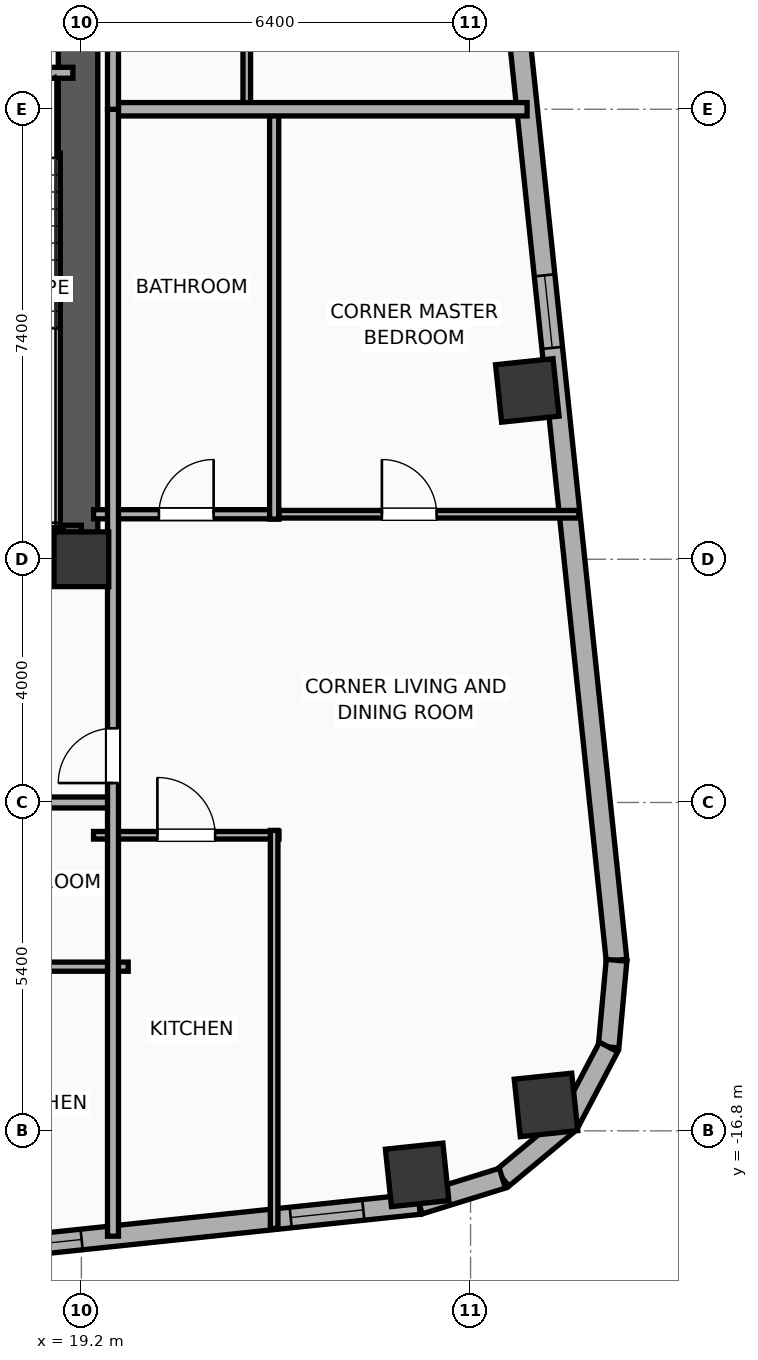
"""IFC4 building model, lengths in metres.
Left out: names, types, materials, properties, quantities, classifications, styles, units other than length and angle.
Written with IfcOpenShell. Run it as: python <this file> out.ifc"""

import sys

from ifc_helpers import new_model, si_unit, direction, frame, frame_2d, origin, origin_2d, place, context, subcontext, project, spatial, rectangle, hollow_rectangle, hollow_circle, extrude, element, fill, save


model = new_model("IFC4")
c1 = context("Model", 3, precision=1e-05, world=origin(), true_north=direction((0.0, 1.0)))
c2 = subcontext(c1, "Body", "Model", "MODEL_VIEW")
j1 = project(units=[si_unit("LENGTHUNIT", "METRE"), si_unit("PLANEANGLEUNIT", "RADIAN")], contexts=[c1])
p1 = place(None, origin())
s1 = spatial("IfcSite", under=j1, at=p1, CompositionType="ELEMENT")
p2 = place(p1, origin())
s2 = spatial("IfcBuilding", under=s1, at=p2, CompositionType="ELEMENT")
p3 = place(p2, frame((0.0, 0.0, 152.1)))
s3 = spatial("IfcBuildingStorey", under=s2, at=p3, CompositionType="ELEMENT", Elevation=152.1)
p4 = place(p3, frame((19.2, -7.4, 0.0), z_axis=(0.0, 0.0, 1.0), x_axis=(1.0, 0.0, 0.0)))
e1 = element("IfcColumn", 1, at=p4, inside=s3, PredefinedType="COLUMN", context=c2, shape_type="SweptSolid", body=[
    extrude(rectangle(XDim=0.9, YDim=0.9, at=origin_2d()), origin(), (0.0, 0.0, 1.0), 3.9),
])
p5 = place(p3, frame((12.175, -7.4, 0.0), z_axis=(0.0, 0.0, 1.0), x_axis=(1.0, 0.0, 0.0)))
e2 = element("IfcWall", 2, at=p5, inside=s3, PredefinedType="SHEAR", context=c2, shape_type="SweptSolid", body=[
    extrude(rectangle(XDim=7.25, YDim=0.45, at=frame_2d((3.625, 0.0))), origin(), (0.0, 0.0, 1.0), 3.65),
])
p6 = place(p3, frame((19.145, -7.4, 0.0), z_axis=(0.0, 0.0, 1.0), x_axis=(0.0, 1.0, 0.0)))
e3 = element("IfcWall", 3, at=p6, inside=s3, PredefinedType="SHEAR", context=c2, shape_type="SweptSolid", body=[
    extrude(rectangle(XDim=14.8, YDim=0.65, at=frame_2d((7.4, 0.0))), origin(), (0.0, 0.0, 1.0), 3.65),
])
p7 = place(p3, frame((15.74, -6.965, 0.0), z_axis=(0.0, 0.0, 1.0), x_axis=(1.0, 0.0, 0.0)))
e4 = element("IfcWall", 4, at=p7, inside=s3, PredefinedType="SOLIDWALL", context=c2, shape_type="SweptSolid", body=[
    extrude(rectangle(XDim=3.46, YDim=0.25, at=frame_2d((1.73, 0.0))), origin(), (0.0, 0.0, 1.0), 3.65),
])
p8 = place(p3, frame((24.722, -17.524, 0.0), z_axis=(0.0, 0.0, 1.0), x_axis=(0.994521895368, 0.104528463268, 0.0)))
e5 = element("IfcColumn", 5, at=p8, inside=s3, PredefinedType="COLUMN", context=c2, shape_type="SweptSolid", body=[
    extrude(hollow_rectangle(XDim=0.95, YDim=0.95, WallThickness=0.032, at=origin_2d()), origin(), (0.0, 0.0, 1.0), 3.9),
])
p9 = place(p3, frame((26.841, -16.374, 0.0), z_axis=(0.0, 0.0, 1.0), x_axis=(0.994521895368, 0.104528463268, 0.0)))
e6 = element("IfcColumn", 6, at=p9, inside=s3, PredefinedType="COLUMN", context=c2, shape_type="SweptSolid", body=[
    extrude(hollow_circle(Radius=0.475, WallThickness=0.032, at=origin_2d()), origin(), (0.0, 0.0, 1.0), 3.9),
])
p10 = place(p3, frame((26.533, -4.624, 0.0), z_axis=(0.0, 0.0, 1.0), x_axis=(0.994521895368, 0.104528463268, 0.0)))
e7 = element("IfcColumn", 7, at=p10, inside=s3, PredefinedType="COLUMN", context=c2, shape_type="SweptSolid", body=[
    extrude(hollow_rectangle(XDim=0.95, YDim=0.95, WallThickness=0.032, at=origin_2d()), origin(), (0.0, 0.0, 1.0), 3.9),
])
p11 = place(p3, frame((24.756, -18.003, 0.0), z_axis=(0.0, 0.0, 1.0), x_axis=(-0.99452160744, -0.104531202687, 0.0)))
e8 = element("IfcWall", 8, at=p11, inside=s3, PredefinedType="ELEMENTEDWALL", context=c2, shape_type="SweptSolid", body=[
    extrude(rectangle(XDim=51.967, YDim=0.34, at=frame_2d((25.983, 0.0))), origin(), (0.0, 0.0, 1.0), 3.65),
])
p12 = place(p11, frame((25.633, 0.0, 0.75)))
e9 = element("IfcOpeningElement", 9, at=p12, cuts=e8, PredefinedType="OPENING", context=c2, shape_type="SweptSolid", body=[
    extrude(rectangle(XDim=2.4, YDim=2.1, at=frame_2d((1.2, 1.05))), frame((0.0, 0.18, 0.0), z_axis=(0.0, -1.0, 0.0), x_axis=(1.0, 0.0, 0.0)), (0.0, 0.0, 1.0), 0.36),
])
p13 = place(p11, frame((42.369, 0.0, 0.75)))
e10 = element("IfcOpeningElement", 10, at=p13, cuts=e8, PredefinedType="OPENING", context=c2, shape_type="SweptSolid", body=[
    extrude(rectangle(XDim=1.2, YDim=2.05, at=frame_2d((0.6, 1.025))), frame((0.0, 0.18, 0.0), z_axis=(0.0, -1.0, 0.0), x_axis=(1.0, 0.0, 0.0)), (0.0, 0.0, 1.0), 0.36),
])
p14 = place(p11, frame((34.085, 0.0, 0.75)))
e11 = element("IfcOpeningElement", 11, at=p14, cuts=e8, PredefinedType="OPENING", context=c2, shape_type="SweptSolid", body=[
    extrude(rectangle(XDim=1.2, YDim=2.05, at=frame_2d((0.6, 1.025))), frame((0.0, 0.18, 0.0), z_axis=(0.0, -1.0, 0.0), x_axis=(1.0, 0.0, 0.0)), (0.0, 0.0, 1.0), 0.36),
])
p15 = place(p11, frame((36.993, 0.0, 0.75)))
e12 = element("IfcOpeningElement", 12, at=p15, cuts=e8, PredefinedType="OPENING", context=c2, shape_type="SweptSolid", body=[
    extrude(rectangle(XDim=1.2, YDim=2.05, at=frame_2d((0.6, 1.025))), frame((0.0, 0.18, 0.0), z_axis=(0.0, -1.0, 0.0), x_axis=(1.0, 0.0, 0.0)), (0.0, 0.0, 1.0), 0.36),
])
p16 = place(p11, frame((14.397, 0.0, 0.75)))
e13 = element("IfcOpeningElement", 13, at=p16, cuts=e8, PredefinedType="OPENING", context=c2, shape_type="SweptSolid", body=[
    extrude(rectangle(XDim=1.2, YDim=2.05, at=frame_2d((0.6, 1.025))), frame((0.0, 0.18, 0.0), z_axis=(0.0, -1.0, 0.0), x_axis=(1.0, 0.0, 0.0)), (0.0, 0.0, 1.0), 0.36),
])
p17 = place(p11, frame((11.489, 0.0, 0.75)))
e14 = element("IfcOpeningElement", 14, at=p17, cuts=e8, PredefinedType="OPENING", context=c2, shape_type="SweptSolid", body=[
    extrude(rectangle(XDim=1.2, YDim=2.05, at=frame_2d((0.6, 1.025))), frame((0.0, 0.18, 0.0), z_axis=(0.0, -1.0, 0.0), x_axis=(1.0, 0.0, 0.0)), (0.0, 0.0, 1.0), 0.36),
])
p18 = place(p11, frame((8.521, 0.0, 0.75)))
e15 = element("IfcOpeningElement", 15, at=p18, cuts=e8, PredefinedType="OPENING", context=c2, shape_type="SweptSolid", body=[
    extrude(rectangle(XDim=1.2, YDim=2.05, at=frame_2d((0.6, 1.025))), frame((0.0, 0.18, 0.0), z_axis=(0.0, -1.0, 0.0), x_axis=(1.0, 0.0, 0.0)), (0.0, 0.0, 1.0), 0.36),
])
p19 = place(p11, frame((5.582, 0.0, 0.75)))
e16 = element("IfcOpeningElement", 16, at=p19, cuts=e8, PredefinedType="OPENING", context=c2, shape_type="SweptSolid", body=[
    extrude(rectangle(XDim=1.2, YDim=2.05, at=frame_2d((0.6, 1.025))), frame((0.0, 0.18, 0.0), z_axis=(0.0, -1.0, 0.0), x_axis=(1.0, 0.0, 0.0)), (0.0, 0.0, 1.0), 0.36),
])
p20 = place(p11, frame((29.313, 0.0, 0.75)))
e17 = element("IfcOpeningElement", 17, at=p20, cuts=e8, PredefinedType="OPENING", context=c2, shape_type="SweptSolid", body=[
    extrude(rectangle(XDim=1.2, YDim=2.05, at=frame_2d((0.6, 1.025))), frame((0.0, 0.18, 0.0), z_axis=(0.0, -1.0, 0.0), x_axis=(1.0, 0.0, 0.0)), (0.0, 0.0, 1.0), 0.36),
])
p21 = place(p11, frame((22.248, 0.0, 0.75)))
e18 = element("IfcOpeningElement", 18, at=p21, cuts=e8, PredefinedType="OPENING", context=c2, shape_type="SweptSolid", body=[
    extrude(rectangle(XDim=1.2, YDim=2.05, at=frame_2d((0.6, 1.025))), frame((0.0, 0.18, 0.0), z_axis=(0.0, -1.0, 0.0), x_axis=(1.0, 0.0, 0.0)), (0.0, 0.0, 1.0), 0.36),
])
p22 = place(p11, frame((18.186, 0.0, 0.75)))
e19 = element("IfcOpeningElement", 19, at=p22, cuts=e8, PredefinedType="OPENING", context=c2, shape_type="SweptSolid", body=[
    extrude(rectangle(XDim=1.2, YDim=2.05, at=frame_2d((0.6, 1.025))), frame((0.0, 0.18, 0.0), z_axis=(0.0, -1.0, 0.0), x_axis=(1.0, 0.0, 0.0)), (0.0, 0.0, 1.0), 0.36),
])
p23 = place(p11, frame((47.879, 0.0, 0.75)))
e20 = element("IfcOpeningElement", 20, at=p23, cuts=e8, PredefinedType="OPENING", context=c2, shape_type="SweptSolid", body=[
    extrude(rectangle(XDim=1.2, YDim=2.05, at=frame_2d((0.6, 1.025))), frame((0.0, 0.18, 0.0), z_axis=(0.0, -1.0, 0.0), x_axis=(1.0, 0.0, 0.0)), (0.0, 0.0, 1.0), 0.36),
])
p24 = place(p11, frame((49.844, 0.0, 0.75)))
e21 = element("IfcOpeningElement", 21, at=p24, cuts=e8, PredefinedType="OPENING", context=c2, shape_type="SweptSolid", body=[
    extrude(rectangle(XDim=1.2, YDim=2.05, at=frame_2d((0.6, 1.025))), frame((0.0, 0.18, 0.0), z_axis=(0.0, -1.0, 0.0), x_axis=(1.0, 0.0, 0.0)), (0.0, 0.0, 1.0), 0.36),
])
p25 = place(p11, frame((0.925, 0.0, 0.75)))
e22 = element("IfcOpeningElement", 22, at=p25, cuts=e8, PredefinedType="OPENING", context=c2, shape_type="SweptSolid", body=[
    extrude(rectangle(XDim=1.2, YDim=2.05, at=frame_2d((0.6, 1.025))), frame((0.0, 0.18, 0.0), z_axis=(0.0, -1.0, 0.0), x_axis=(1.0, 0.0, 0.0)), (0.0, 0.0, 1.0), 0.36),
])
p26 = place(p3, frame((24.534, 18.99, 0.0), z_axis=(0.0, 0.0, 1.0), x_axis=(0.104534959766, -0.994521212537, 0.0)))
e23 = element("IfcWall", 23, at=p26, inside=s3, PredefinedType="ELEMENTEDWALL", context=c2, shape_type="SweptSolid", body=[
    extrude(rectangle(XDim=33.166, YDim=0.34, at=frame_2d((16.583, 0.0))), origin(), (0.0, 0.0, 1.0), 3.65),
])
p27 = place(p26, frame((6.542, 0.0, 0.75)))
e24 = element("IfcOpeningElement", 24, at=p27, cuts=e23, PredefinedType="OPENING", context=c2, shape_type="SweptSolid", body=[
    extrude(rectangle(XDim=1.8, YDim=2.1, at=frame_2d((0.9, 1.05))), frame((0.0, 0.18, 0.0), z_axis=(0.0, -1.0, 0.0), x_axis=(1.0, 0.0, 0.0)), (0.0, 0.0, 1.0), 0.36),
])
p28 = place(p26, frame((21.84, 0.0, 0.75)))
e25 = element("IfcOpeningElement", 25, at=p28, cuts=e23, PredefinedType="OPENING", context=c2, shape_type="SweptSolid", body=[
    extrude(rectangle(XDim=1.2, YDim=2.05, at=frame_2d((0.6, 1.025))), frame((0.0, 0.18, 0.0), z_axis=(0.0, -1.0, 0.0), x_axis=(1.0, 0.0, 0.0)), (0.0, 0.0, 1.0), 0.36),
])
p29 = place(p3, frame((28.001, -13.995, 0.0), z_axis=(0.0, 0.0, 1.0), x_axis=(-0.091534682358, -0.995801888894, 0.0)))
e26 = element("IfcWall", 26, at=p29, inside=s3, PredefinedType="ELEMENTEDWALL", context=c2, shape_type="SweptSolid", body=[
    extrude(rectangle(XDim=1.432, YDim=0.34, at=frame_2d((0.716, 0.0))), origin(), (0.0, 0.0, 1.0), 3.65),
])
for number, where, z_axis, x_axis in (
    (27, (27.87, -15.421, 0.0), (0.0, 0.0, 1.0), (-0.466, -0.885, 0.0)),
    (28, (27.211, -16.674, 0.0), (0.0, 0.0, 1.0), (-0.769, -0.64, 0.0)),
):
    element("IfcWall", number, at=place(p3, frame(where, z_axis=z_axis, x_axis=x_axis)), inside=s3, PredefinedType="ELEMENTEDWALL", context=c2, shape_type="SweptSolid", body=[
        extrude(rectangle(XDim=1.415, YDim=0.34, at=frame_2d((0.708, 0.0))), origin(), (0.0, 0.0, 1.0), 3.65),
    ])
p30 = place(p3, frame((26.123, -17.579, 0.0), z_axis=(0.0, 0.0, 1.0), x_axis=(-0.955042500381, -0.296468923271, 0.0)))
e29 = element("IfcWall", 29, at=p30, inside=s3, PredefinedType="ELEMENTEDWALL", context=c2, shape_type="SweptSolid", body=[
    extrude(rectangle(XDim=1.432, YDim=0.34, at=frame_2d((0.716, 0.0))), origin(), (0.0, 0.0, 1.0), 3.65),
])
p31 = place(p3, frame((15.7, 0.6, 0.0), z_axis=(0.0, 0.0, 1.0), x_axis=(1.0, 0.0, 0.0)))
e30 = element("IfcWall", 30, at=p31, inside=s3, PredefinedType="PARTITIONING", context=c2, shape_type="SweptSolid", body=[
    extrude(rectangle(XDim=3.36, YDim=0.18, at=frame_2d((1.68, 0.0))), origin(), (0.0, 0.0, 1.0), 3.65),
])
p32 = place(p31, frame((1.155, 0.0, 0.0)))
e31 = element("IfcOpeningElement", 31, at=p32, cuts=e30, PredefinedType="OPENING", context=c2, shape_type="SweptSolid", body=[
    extrude(rectangle(XDim=1.05, YDim=2.05, at=frame_2d((0.525, 1.025))), frame((0.0, 0.1, 0.0), z_axis=(0.0, -1.0, 0.0), x_axis=(1.0, 0.0, 0.0)), (0.0, 0.0, 1.0), 0.2),
])
p33 = place(p3, frame((17.42, -14.1, 0.0), z_axis=(0.0, 0.0, 1.0), x_axis=(1.0, 0.0, 0.0)))
e32 = element("IfcWall", 32, at=p33, inside=s3, PredefinedType="PLUMBINGWALL", context=c2, shape_type="SweptSolid", body=[
    extrude(rectangle(XDim=2.55, YDim=0.15, at=frame_2d((1.275, 0.0))), origin(), (0.0, 0.0, 1.0), 3.65),
])
p34 = place(p3, frame((8.08, -11.4, 0.0), z_axis=(0.0, 0.0, 1.0), x_axis=(1.0, 0.0, 0.0)))
e33 = element("IfcWall", 33, at=p34, inside=s3, PredefinedType="PARTITIONING", context=c2, shape_type="SweptSolid", body=[
    extrude(rectangle(XDim=11.67, YDim=0.18, at=frame_2d((5.835, 0.0))), origin(), (0.0, 0.0, 1.0), 3.65),
])
p35 = place(p34, frame((1.213, 0.0, 0.0)))
e34 = element("IfcOpeningElement", 34, at=p35, cuts=e33, PredefinedType="OPENING", context=c2, shape_type="SweptSolid", body=[
    extrude(rectangle(XDim=1.15, YDim=2.05, at=frame_2d((0.575, 1.025))), frame((0.0, 0.1, 0.0), z_axis=(0.0, -1.0, 0.0), x_axis=(1.0, 0.0, 0.0)), (0.0, 0.0, 1.0), 0.2),
])
p36 = place(p34, frame((7.057, 0.0, 0.0)))
e35 = element("IfcOpeningElement", 35, at=p36, cuts=e33, PredefinedType="OPENING", context=c2, shape_type="SweptSolid", body=[
    extrude(rectangle(XDim=1.15, YDim=2.05, at=frame_2d((0.575, 1.025))), frame((0.0, 0.1, 0.0), z_axis=(0.0, -1.0, 0.0), x_axis=(1.0, 0.0, 0.0)), (0.0, 0.0, 1.0), 0.2),
])
p37 = place(p3, frame((22.31, -6.66, 0.0), z_axis=(0.0, 0.0, 1.0), x_axis=(1.0, 0.0, 0.0)))
e36 = element("IfcWall", 36, at=p37, inside=s3, PredefinedType="PARTITIONING", context=c2, shape_type="SweptSolid", body=[
    extrude(rectangle(XDim=5.071, YDim=0.125, at=frame_2d((2.536, 0.0))), origin(), (0.0, 0.0, 1.0), 3.65),
])
p38 = place(p37, frame((1.832, 0.0, 0.0)))
e37 = element("IfcOpeningElement", 37, at=p38, cuts=e36, PredefinedType="OPENING", context=c2, shape_type="SweptSolid", body=[
    extrude(rectangle(XDim=0.9, YDim=2.05, at=frame_2d((0.45, 1.025))), frame((0.0, 0.073, 0.0), z_axis=(0.0, -1.0, 0.0), x_axis=(1.0, 0.0, 0.0)), (0.0, 0.0, 1.0), 0.145),
])
p39 = place(p3, frame((19.4, -11.939, 0.0), z_axis=(0.0, 0.0, 1.0), x_axis=(1.0, 0.0, 0.0)))
e38 = element("IfcWall", 38, at=p39, inside=s3, PredefinedType="PARTITIONING", context=c2, shape_type="SweptSolid", body=[
    extrude(rectangle(XDim=3.05, YDim=0.125, at=frame_2d((1.525, 0.0))), origin(), (0.0, 0.0, 1.0), 3.65),
])
p40 = place(p39, frame((1.05, 0.0, 0.0)))
e39 = element("IfcOpeningElement", 39, at=p40, cuts=e38, PredefinedType="OPENING", context=c2, shape_type="SweptSolid", body=[
    extrude(rectangle(XDim=0.95, YDim=2.05, at=frame_2d((0.475, 1.025))), frame((0.0, 0.073, 0.0), z_axis=(0.0, -1.0, 0.0), x_axis=(1.0, 0.0, 0.0)), (0.0, 0.0, 1.0), 0.145),
])
p41 = place(p3, frame((19.4, -6.66, 0.0), z_axis=(0.0, 0.0, 1.0), x_axis=(1.0, 0.0, 0.0)))
e40 = element("IfcWall", 40, at=p41, inside=s3, PredefinedType="PLUMBINGWALL", context=c2, shape_type="SweptSolid", body=[
    extrude(rectangle(XDim=3.05, YDim=0.15, at=frame_2d((1.525, 0.0))), origin(), (0.0, 0.0, 1.0), 3.04),
])
p42 = place(p41, frame((1.075, 0.0, 0.0)))
e41 = element("IfcOpeningElement", 41, at=p42, cuts=e40, PredefinedType="OPENING", context=c2, shape_type="SweptSolid", body=[
    extrude(rectangle(XDim=0.9, YDim=2.05, at=frame_2d((0.45, 1.025))), frame((0.0, 0.085, 0.0), z_axis=(0.0, -1.0, 0.0), x_axis=(1.0, 0.0, 0.0)), (0.0, 0.0, 1.0), 0.17),
])
p43 = place(p3, frame((22.37, -18.405, 0.0), z_axis=(0.0, 0.0, 1.0), x_axis=(0.0, 1.0, 0.0)))
e42 = element("IfcWall", 42, at=p43, inside=s3, PredefinedType="PARTITIONING", context=c2, shape_type="SweptSolid", body=[
    extrude(rectangle(XDim=6.546, YDim=0.125, at=frame_2d((3.273, 0.0))), origin(), (0.0, 0.0, 1.0), 3.65),
])
p44 = place(p3, frame((22.37, -6.74, 0.0), z_axis=(0.0, 0.0, 1.0), x_axis=(0.0, 1.0, 0.0)))
e43 = element("IfcWall", 43, at=p44, inside=s3, PredefinedType="PLUMBINGWALL", context=c2, shape_type="SweptSolid", body=[
    extrude(rectangle(XDim=6.72, YDim=0.15, at=frame_2d((3.36, 0.0))), origin(), (0.0, 0.0, 1.0), 3.65),
])
p45 = place(p3, frame((21.92, 0.02, 0.0), z_axis=(0.0, 0.0, 1.0), x_axis=(0.0, 1.0, 0.0)))
e44 = element("IfcWall", 44, at=p45, inside=s3, PredefinedType="PARTITIONING", context=c2, shape_type="SweptSolid", body=[
    extrude(rectangle(XDim=6.72, YDim=0.125, at=frame_2d((3.36, 0.0))), origin(), (0.0, 0.0, 1.0), 3.65),
])
p46 = place(p3, frame((19.72, 0.0, 0.0), z_axis=(0.0, 0.0, 1.0), x_axis=(1.0, 0.0, 0.0)))
e45 = element("IfcWall", 45, at=p46, inside=s3, PredefinedType="PARTITIONING", context=c2, shape_type="SweptSolid", body=[
    extrude(rectangle(XDim=6.81, YDim=0.22, at=frame_2d((3.405, 0.0))), origin(), (0.0, 0.0, 1.0), 3.65),
])
p47 = place(p3, frame((19.72, -18.532, 0.0), z_axis=(0.0, 0.0, 1.0), x_axis=(0.0, 1.0, 0.0)))
e46 = element("IfcWall", 46, at=p47, inside=s3, PredefinedType="PARTITIONING", context=c2, shape_type="SweptSolid", body=[
    extrude(rectangle(XDim=18.532, YDim=0.18, at=frame_2d((9.266, 0.0))), origin(), (0.0, 0.0, 1.0), 3.65),
])
p48 = place(p47, frame((7.452, 0.0, 0.0)))
e47 = element("IfcOpeningElement", 47, at=p48, cuts=e46, PredefinedType="OPENING", context=c2, shape_type="SweptSolid", body=[
    extrude(rectangle(XDim=0.9, YDim=2.05, at=frame_2d((0.45, 1.025))), frame((0.0, 0.1, 0.0), z_axis=(0.0, -1.0, 0.0), x_axis=(1.0, 0.0, 0.0)), (0.0, 0.0, 1.0), 0.2),
])
p49 = place(p3, frame((19.72, 0.0, 0.0), z_axis=(0.0, 0.0, 1.0), x_axis=(0.0, 1.0, 0.0)))
e48 = element("IfcWall", 48, at=p49, inside=s3, PredefinedType="PARTITIONING", context=c2, shape_type="SweptSolid", body=[
    extrude(rectangle(XDim=22.15, YDim=0.18, at=frame_2d((11.075, 0.0))), origin(), (0.0, 0.0, 1.0), 3.04),
])
p50 = place(p49, frame((10.18, 0.0, 0.0)))
e49 = element("IfcOpeningElement", 49, at=p50, cuts=e48, PredefinedType="OPENING", context=c2, shape_type="SweptSolid", body=[
    extrude(rectangle(XDim=0.9, YDim=2.05, at=frame_2d((0.45, 1.025))), frame((0.0, 0.1, 0.0), z_axis=(0.0, -1.0, 0.0), x_axis=(1.0, 0.0, 0.0)), (0.0, 0.0, 1.0), 0.2),
])
p51 = place(p19, origin())
e50 = element("IfcWindow", 50, at=p51, inside=s3, PartitioningType="SINGLE_PANEL", PredefinedType="WINDOW", context=c2, shape_type="SweptSolid", body=[
    extrude(rectangle(XDim=1.2, YDim=2.05, at=frame_2d((0.6, 1.025))), frame((0.0, 0.03, 0.0), z_axis=(0.0, -1.0, 0.0), x_axis=(1.0, 0.0, 0.0)), (0.0, 0.0, 1.0), 0.06),
])
fill(e16, e50)
p52 = place(p25, origin())
e51 = element("IfcWindow", 51, at=p52, inside=s3, PartitioningType="SINGLE_PANEL", PredefinedType="WINDOW", context=c2, shape_type="SweptSolid", body=[
    extrude(rectangle(XDim=1.2, YDim=2.05, at=frame_2d((0.6, 1.025))), frame((0.0, 0.03, 0.0), z_axis=(0.0, -1.0, 0.0), x_axis=(1.0, 0.0, 0.0)), (0.0, 0.0, 1.0), 0.06),
])
fill(e22, e51)
p53 = place(p28, origin())
e52 = element("IfcWindow", 52, at=p53, inside=s3, PartitioningType="SINGLE_PANEL", PredefinedType="WINDOW", context=c2, shape_type="SweptSolid", body=[
    extrude(rectangle(XDim=1.2, YDim=2.05, at=frame_2d((0.6, 1.025))), frame((0.0, 0.03, 0.0), z_axis=(0.0, -1.0, 0.0), x_axis=(1.0, 0.0, 0.0)), (0.0, 0.0, 1.0), 0.06),
])
fill(e25, e52)
p54 = place(p38, origin())
e53 = element("IfcDoor", 53, at=p54, inside=s3, OperationType="SINGLE_SWING_LEFT", PredefinedType="DOOR", context=c2, shape_type="SweptSolid", body=[
    extrude(rectangle(XDim=0.9, YDim=2.05, at=frame_2d((0.45, 1.025))), frame((0.0, 0.025, 0.0), z_axis=(0.0, -1.0, 0.0), x_axis=(1.0, 0.0, 0.0)), (0.0, 0.0, 1.0), 0.05),
])
fill(e37, e53)
p55 = place(p40, origin())
e54 = element("IfcDoor", 54, at=p55, inside=s3, OperationType="SINGLE_SWING_LEFT", PredefinedType="DOOR", context=c2, shape_type="SweptSolid", body=[
    extrude(rectangle(XDim=0.95, YDim=2.05, at=frame_2d((0.475, 1.025))), frame((0.0, 0.025, 0.0), z_axis=(0.0, -1.0, 0.0), x_axis=(1.0, 0.0, 0.0)), (0.0, 0.0, 1.0), 0.05),
])
fill(e39, e54)
p56 = place(p42, origin())
e55 = element("IfcDoor", 55, at=p56, inside=s3, OperationType="SINGLE_SWING_RIGHT", PredefinedType="DOOR", context=c2, shape_type="SweptSolid", body=[
    extrude(rectangle(XDim=0.9, YDim=2.05, at=frame_2d((0.45, 1.025))), frame((0.0, 0.025, 0.0), z_axis=(0.0, -1.0, 0.0), x_axis=(1.0, 0.0, 0.0)), (0.0, 0.0, 1.0), 0.05),
])
fill(e41, e55)
p57 = place(p48, origin())
e56 = element("IfcDoor", 56, at=p57, inside=s3, OperationType="SINGLE_SWING_LEFT", PredefinedType="DOOR", context=c2, shape_type="SweptSolid", body=[
    extrude(rectangle(XDim=0.9, YDim=2.05, at=frame_2d((0.45, 1.025))), frame((0.0, 0.025, 0.0), z_axis=(0.0, -1.0, 0.0), x_axis=(1.0, 0.0, 0.0)), (0.0, 0.0, 1.0), 0.05),
])
fill(e47, e56)
save(model, sys.argv[1])
